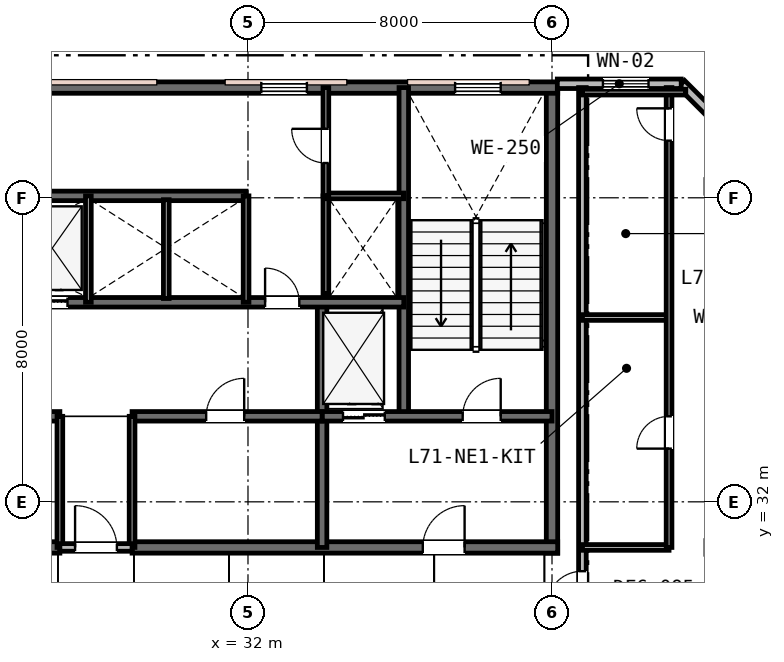
"""IFC4 building model, lengths in metres.
Left out: names, types, materials, properties, quantities, classifications, styles, units other than length and angle.
Written with IfcOpenShell. Run it as: python <this file> out.ifc"""

import sys

from ifc_helpers import new_model, si_unit, direction, frame, frame_2d, origin, place, context, subcontext, project, spatial, rectangle, extrude, element, fill, save


model = new_model("IFC4")
c1 = context("Model", 3, precision=1e-05, world=origin(), true_north=direction((0.0, 1.0)))
c2 = subcontext(c1, "Body", "Model", "MODEL_VIEW")
j1 = project(units=[si_unit("LENGTHUNIT", "METRE"), si_unit("PLANEANGLEUNIT", "RADIAN")], contexts=[c1])
p1 = place(None, origin())
s1 = spatial("IfcSite", under=j1, at=p1, CompositionType="ELEMENT")
p2 = place(p1, origin())
s2 = spatial("IfcBuilding", under=s1, at=p2, CompositionType="ELEMENT")
p3 = place(p2, frame((0.0, 0.0, 275.4)))
s3 = spatial("IfcBuildingStorey", under=s2, at=p3, CompositionType="ELEMENT", Elevation=275.4)
p4 = place(p3, frame((40.0, 30.65, 0.0), z_axis=(0.0, 0.0, 1.0), x_axis=(0.0, 1.0, 0.0)))
e1 = element("IfcWall", 1, at=p4, inside=s3, PredefinedType="SHEAR", context=c2, shape_type="SweptSolid", body=[
    extrude(rectangle(XDim=12.3, YDim=0.3, at=frame_2d((6.15, 0.0))), origin(), (0.0, 0.0, 1.0), 3.8),
])
p5 = place(p3, frame((15.85, 42.9, 0.0), z_axis=(0.0, 0.0, 1.0), x_axis=(1.0, 0.0, 0.0)))
e2 = element("IfcWall", 2, at=p5, inside=s3, PredefinedType="SHEAR", context=c2, shape_type="SweptSolid", body=[
    extrude(rectangle(XDim=24.3, YDim=0.3, at=frame_2d((12.15, 0.0))), origin(), (0.0, 0.0, 1.0), 3.8),
])
p6 = place(p5, frame((1.6, 0.0, 0.95)))
e3 = element("IfcOpeningElement", 3, at=p6, cuts=e2, PredefinedType="OPENING", context=c2, shape_type="SweptSolid", body=[
    extrude(rectangle(XDim=1.2, YDim=1.6, at=frame_2d((0.6, 0.8))), frame((0.0, 0.16, 0.0), z_axis=(0.0, -1.0, 0.0), x_axis=(1.0, 0.0, 0.0)), (0.0, 0.0, 1.0), 0.32),
])
p7 = place(p5, frame((16.5, 0.0, 0.95)))
e4 = element("IfcOpeningElement", 4, at=p7, cuts=e2, PredefinedType="OPENING", context=c2, shape_type="SweptSolid", body=[
    extrude(rectangle(XDim=1.2, YDim=1.6, at=frame_2d((0.6, 0.8))), frame((0.0, 0.16, 0.0), z_axis=(0.0, -1.0, 0.0), x_axis=(1.0, 0.0, 0.0)), (0.0, 0.0, 1.0), 0.32),
])
p8 = place(p5, frame((21.6, 0.0, 0.95)))
e5 = element("IfcOpeningElement", 5, at=p8, cuts=e2, PredefinedType="OPENING", context=c2, shape_type="SweptSolid", body=[
    extrude(rectangle(XDim=1.2, YDim=1.6, at=frame_2d((0.6, 0.8))), frame((0.0, 0.16, 0.0), z_axis=(0.0, -1.0, 0.0), x_axis=(1.0, 0.0, 0.0)), (0.0, 0.0, 1.0), 0.32),
])
p9 = place(p3, frame((15.85, 30.8, 0.0), z_axis=(0.0, 0.0, 1.0), x_axis=(1.0, 0.0, 0.0)))
e6 = element("IfcWall", 6, at=p9, inside=s3, PredefinedType="SHEAR", context=c2, shape_type="SweptSolid", body=[
    extrude(rectangle(XDim=11.2, YDim=0.3, at=frame_2d((5.6, 0.0))), origin(), (0.0, 0.0, 1.0), 3.8),
])
p10 = place(p9, frame((2.45, 0.0, 0.0)))
e7 = element("IfcOpeningElement", 7, at=p10, cuts=e6, PredefinedType="OPENING", context=c2, shape_type="SweptSolid", body=[
    extrude(rectangle(XDim=1.1, YDim=2.15, at=frame_2d((0.55, 1.075))), frame((0.0, 0.16, 0.0), z_axis=(0.0, -1.0, 0.0), x_axis=(1.0, 0.0, 0.0)), (0.0, 0.0, 1.0), 0.32),
])
p11 = place(p3, frame((28.95, 30.8, 0.0), z_axis=(0.0, 0.0, 1.0), x_axis=(1.0, 0.0, 0.0)))
e8 = element("IfcWall", 8, at=p11, inside=s3, PredefinedType="SHEAR", context=c2, shape_type="SweptSolid", body=[
    extrude(rectangle(XDim=11.2, YDim=0.3, at=frame_2d((5.6, 0.0))), origin(), (0.0, 0.0, 1.0), 3.8),
])
p12 = place(p11, frame((7.65, 0.0, 0.0)))
e9 = element("IfcOpeningElement", 9, at=p12, cuts=e8, PredefinedType="OPENING", context=c2, shape_type="SweptSolid", body=[
    extrude(rectangle(XDim=1.1, YDim=2.15, at=frame_2d((0.55, 1.075))), frame((0.0, 0.16, 0.0), z_axis=(0.0, -1.0, 0.0), x_axis=(1.0, 0.0, 0.0)), (0.0, 0.0, 1.0), 0.32),
])
p13 = place(p3, frame((36.1, 34.25, 0.0), z_axis=(0.0, 0.0, 1.0), x_axis=(0.0, 1.0, 0.0)))
e10 = element("IfcWall", 10, at=p13, inside=s3, PredefinedType="SHEAR", context=c2, shape_type="SweptSolid", body=[
    extrude(rectangle(XDim=8.65, YDim=0.25, at=frame_2d((4.325, 0.0))), origin(), (0.0, 0.0, 1.0), 3.8),
])
p14 = place(p3, frame((33.95, 30.8, 0.0), z_axis=(0.0, 0.0, 1.0), x_axis=(0.0, 1.0, 0.0)))
e11 = element("IfcWall", 11, at=p14, inside=s3, PredefinedType="SHEAR", context=c2, shape_type="SweptSolid", body=[
    extrude(rectangle(XDim=6.45, YDim=0.25, at=frame_2d((3.225, 0.0))), origin(), (0.0, 0.0, 1.0), 3.8),
])
p15 = place(p3, frame((33.95, 34.25, 0.0), z_axis=(0.0, 0.0, 1.0), x_axis=(1.0, 0.0, 0.0)))
e12 = element("IfcWall", 12, at=p15, inside=s3, PredefinedType="SHEAR", context=c2, shape_type="SweptSolid", body=[
    extrude(rectangle(XDim=6.05, YDim=0.25, at=frame_2d((3.025, 0.0))), origin(), (0.0, 0.0, 1.0), 3.8),
])
p16 = place(p15, frame((3.7, 0.0, 0.0)))
e13 = element("IfcOpeningElement", 13, at=p16, cuts=e12, PredefinedType="OPENING", context=c2, shape_type="SweptSolid", body=[
    extrude(rectangle(XDim=1.0, YDim=2.15, at=frame_2d((0.5, 1.075))), frame((0.0, 0.135, 0.0), z_axis=(0.0, -1.0, 0.0), x_axis=(1.0, 0.0, 0.0)), (0.0, 0.0, 1.0), 0.27),
])
p17 = place(p15, frame((0.55, 0.0, 0.0)))
e14 = element("IfcOpeningElement", 14, at=p17, cuts=e12, PredefinedType="OPENING", context=c2, shape_type="SweptSolid", body=[
    extrude(rectangle(XDim=1.1, YDim=2.15, at=frame_2d((0.55, 1.075))), frame((0.0, 0.135, 0.0), z_axis=(0.0, -1.0, 0.0), x_axis=(1.0, 0.0, 0.0)), (0.0, 0.0, 1.0), 0.27),
])
p18 = place(p3, frame((22.05, 34.25, 0.0), z_axis=(0.0, 0.0, 1.0), x_axis=(1.0, 0.0, 0.0)))
e15 = element("IfcWall", 15, at=p18, inside=s3, PredefinedType="SHEAR", context=c2, shape_type="SweptSolid", body=[
    extrude(rectangle(XDim=5.0, YDim=0.25, at=frame_2d((2.5, 0.0))), origin(), (0.0, 0.0, 1.0), 3.8),
])
p19 = place(p18, frame((1.95, 0.0, 0.0)))
e16 = element("IfcOpeningElement", 16, at=p19, cuts=e15, PredefinedType="OPENING", context=c2, shape_type="SweptSolid", body=[
    extrude(rectangle(XDim=1.0, YDim=2.15, at=frame_2d((0.5, 1.075))), frame((0.0, 0.135, 0.0), z_axis=(0.0, -1.0, 0.0), x_axis=(1.0, 0.0, 0.0)), (0.0, 0.0, 1.0), 0.27),
])
p20 = place(p3, frame((28.95, 34.25, 0.0), z_axis=(0.0, 0.0, 1.0), x_axis=(1.0, 0.0, 0.0)))
e17 = element("IfcWall", 17, at=p20, inside=s3, PredefinedType="SHEAR", context=c2, shape_type="SweptSolid", body=[
    extrude(rectangle(XDim=5.0, YDim=0.25, at=frame_2d((2.5, 0.0))), origin(), (0.0, 0.0, 1.0), 3.8),
])
p21 = place(p20, frame((1.95, 0.0, 0.0)))
e18 = element("IfcOpeningElement", 18, at=p21, cuts=e17, PredefinedType="OPENING", context=c2, shape_type="SweptSolid", body=[
    extrude(rectangle(XDim=1.0, YDim=2.15, at=frame_2d((0.5, 1.075))), frame((0.0, 0.135, 0.0), z_axis=(0.0, -1.0, 0.0), x_axis=(1.0, 0.0, 0.0)), (0.0, 0.0, 1.0), 0.27),
])
p22 = place(p3, frame((19.9, 37.25, 0.0), z_axis=(0.0, 0.0, 1.0), x_axis=(1.0, 0.0, 0.0)))
e19 = element("IfcWall", 19, at=p22, inside=s3, PredefinedType="SHEAR", context=c2, shape_type="SweptSolid", body=[
    extrude(rectangle(XDim=16.2, YDim=0.25, at=frame_2d((8.1, 0.0))), origin(), (0.0, 0.0, 1.0), 3.8),
])
p23 = place(p22, frame((12.55, 0.0, 0.0)))
e20 = element("IfcOpeningElement", 20, at=p23, cuts=e19, PredefinedType="OPENING", context=c2, shape_type="SweptSolid", body=[
    extrude(rectangle(XDim=0.9, YDim=2.15, at=frame_2d((0.45, 1.075))), frame((0.0, 0.135, 0.0), z_axis=(0.0, -1.0, 0.0), x_axis=(1.0, 0.0, 0.0)), (0.0, 0.0, 1.0), 0.27),
])
p24 = place(p22, frame((2.5, 0.0, 0.0)))
e21 = element("IfcOpeningElement", 21, at=p24, cuts=e19, PredefinedType="OPENING", context=c2, shape_type="SweptSolid", body=[
    extrude(rectangle(XDim=1.05, YDim=2.15, at=frame_2d((0.525, 1.075))), frame((0.0, 0.135, 0.0), z_axis=(0.0, -1.0, 0.0), x_axis=(1.0, 0.0, 0.0)), (0.0, 0.0, 1.0), 0.27),
])
p25 = place(p22, frame((4.4, 0.0, 0.0)))
e22 = element("IfcOpeningElement", 22, at=p25, cuts=e19, PredefinedType="OPENING", context=c2, shape_type="SweptSolid", body=[
    extrude(rectangle(XDim=1.05, YDim=2.15, at=frame_2d((0.525, 1.075))), frame((0.0, 0.135, 0.0), z_axis=(0.0, -1.0, 0.0), x_axis=(1.0, 0.0, 0.0)), (0.0, 0.0, 1.0), 0.27),
])
p26 = place(p22, frame((6.3, 0.0, 0.0)))
e23 = element("IfcOpeningElement", 23, at=p26, cuts=e19, PredefinedType="OPENING", context=c2, shape_type="SweptSolid", body=[
    extrude(rectangle(XDim=1.05, YDim=2.15, at=frame_2d((0.525, 1.075))), frame((0.0, 0.135, 0.0), z_axis=(0.0, -1.0, 0.0), x_axis=(1.0, 0.0, 0.0)), (0.0, 0.0, 1.0), 0.27),
])
p27 = place(p3, frame((19.9, 40.05, 0.0), z_axis=(0.0, 0.0, 1.0), x_axis=(1.0, 0.0, 0.0)))
e24 = element("IfcWall", 24, at=p27, inside=s3, PredefinedType="SHEAR", context=c2, shape_type="SweptSolid", body=[
    extrude(rectangle(XDim=12.05, YDim=0.25, at=frame_2d((6.025, 0.0))), origin(), (0.0, 0.0, 1.0), 3.8),
])
p28 = place(p3, frame((46.0, 40.4, 0.0), z_axis=(0.0, 0.0, 1.0), x_axis=(-0.707106781187, 0.707106781187, 0.0)))
e25 = element("IfcWall", 25, at=p28, inside=s3, PredefinedType="STANDARD", context=c2, shape_type="SweptSolid", body=[
    extrude(rectangle(XDim=3.677, YDim=0.25, at=frame_2d((1.839, 0.0))), origin(), (0.0, 0.0, 1.0), 3.53),
])
p29 = place(p28, frame((1.128, 0.0, 0.85)))
e26 = element("IfcOpeningElement", 26, at=p29, cuts=e25, PredefinedType="OPENING", context=c2, shape_type="SweptSolid", body=[
    extrude(rectangle(XDim=1.2, YDim=1.6, at=frame_2d((0.6, 0.8))), frame((0.0, 0.135, 0.0), z_axis=(0.0, -1.0, 0.0), x_axis=(1.0, 0.0, 0.0)), (0.0, 0.0, 1.0), 0.27),
])
p30 = place(p3, frame((43.4, 43.0, 0.0), z_axis=(0.0, 0.0, 1.0), x_axis=(-1.0, 0.0, 0.0)))
e27 = element("IfcWall", 27, at=p30, inside=s3, PredefinedType="STANDARD", context=c2, shape_type="SweptSolid", body=[
    extrude(rectangle(XDim=3.26, YDim=0.25, at=frame_2d((1.63, 0.0))), origin(), (0.0, 0.0, 1.0), 3.53),
])
p31 = place(p30, frame((0.86, 0.0, 0.85)))
e28 = element("IfcOpeningElement", 28, at=p31, cuts=e27, PredefinedType="OPENING", context=c2, shape_type="SweptSolid", body=[
    extrude(rectangle(XDim=1.2, YDim=1.6, at=frame_2d((0.6, 0.8))), frame((0.0, 0.135, 0.0), z_axis=(0.0, -1.0, 0.0), x_axis=(1.0, 0.0, 0.0)), (0.0, 0.0, 1.0), 0.27),
])
for number, where, z_axis, x_axis in (
    (29, (27.05, 30.8, 0.0), (0.0, 0.0, 1.0), (0.0, 1.0, 0.0)),
    (30, (28.95, 30.8, 0.0), (0.0, 0.0, 1.0), (0.0, 1.0, 0.0)),
):
    element("IfcWall", number, at=place(p3, frame(where, z_axis=z_axis, x_axis=x_axis)), inside=s3, PredefinedType="PLUMBINGWALL", context=c2, shape_type="SweptSolid", body=[
        extrude(rectangle(XDim=3.45, YDim=0.15, at=frame_2d((1.725, 0.0))), origin(), (0.0, 0.0, 1.0), 3.28),
    ])
p32 = place(p3, frame((27.05, 30.8, 0.0), z_axis=(0.0, 0.0, 1.0), x_axis=(1.0, 0.0, 0.0)))
e31 = element("IfcWall", 31, at=p32, inside=s3, PredefinedType="PARTITIONING", context=c2, shape_type="SweptSolid", body=[
    extrude(rectangle(XDim=1.9, YDim=0.2, at=frame_2d((0.95, 0.0))), origin(), (0.0, 0.0, 1.0), 3.28),
])
p33 = place(p32, frame((0.4, 0.0, 0.0)))
e32 = element("IfcOpeningElement", 32, at=p33, cuts=e31, PredefinedType="OPENING", context=c2, shape_type="SweptSolid", body=[
    extrude(rectangle(XDim=1.1, YDim=2.15, at=frame_2d((0.55, 1.075))), frame((0.0, 0.11, 0.0), z_axis=(0.0, -1.0, 0.0), x_axis=(1.0, 0.0, 0.0)), (0.0, 0.0, 1.0), 0.22),
])
for number, where, z_axis, x_axis in (
    (33, (27.8, 37.25, 0.0), (0.0, 0.0, 1.0), (0.0, 1.0, 0.0)),
    (34, (31.95, 37.25, 0.0), (0.0, 0.0, 1.0), (0.0, 1.0, 0.0)),
):
    element("IfcWall", number, at=place(p3, frame(where, z_axis=z_axis, x_axis=x_axis)), inside=s3, PredefinedType="PLUMBINGWALL", context=c2, shape_type="SweptSolid", body=[
        extrude(rectangle(XDim=2.8, YDim=0.15, at=frame_2d((1.4, 0.0))), origin(), (0.0, 0.0, 1.0), 3.53),
    ])
p34 = place(p3, frame((29.85, 37.35, 0.0), z_axis=(0.0, 0.0, 1.0), x_axis=(0.0, 1.0, 0.0)))
e35 = element("IfcWall", 35, at=p34, inside=s3, PredefinedType="PLUMBINGWALL", context=c2, shape_type="SweptSolid", body=[
    extrude(rectangle(XDim=2.6, YDim=0.15, at=frame_2d((1.3, 0.0))), origin(), (0.0, 0.0, 1.0), 3.53),
])
p35 = place(p3, frame((34.05, 37.473, 0.0), z_axis=(0.0, 0.0, 1.0), x_axis=(0.0, 1.0, 0.0)))
e36 = element("IfcWall", 36, at=p35, inside=s3, PredefinedType="PLUMBINGWALL", context=c2, shape_type="SweptSolid", body=[
    extrude(rectangle(XDim=2.577, YDim=0.15, at=frame_2d((1.288, 0.0))), origin(), (0.0, 0.0, 1.0), 3.53),
])
p36 = place(p3, frame((34.05, 40.05, 0.0), z_axis=(0.0, 0.0, 1.0), x_axis=(1.0, 0.0, 0.0)))
e37 = element("IfcWall", 37, at=p36, inside=s3, PredefinedType="PARTITIONING", context=c2, shape_type="SweptSolid", body=[
    extrude(rectangle(XDim=2.05, YDim=0.15, at=frame_2d((1.025, 0.0))), origin(), (0.0, 0.0, 1.0), 3.53),
])
p37 = place(p3, frame((34.05, 40.05, 0.0), z_axis=(0.0, 0.0, 1.0), x_axis=(0.0, 1.0, 0.0)))
e38 = element("IfcWall", 38, at=p37, inside=s3, PredefinedType="PARTITIONING", context=c2, shape_type="SweptSolid", body=[
    extrude(rectangle(XDim=2.85, YDim=0.15, at=frame_2d((1.425, 0.0))), origin(), (0.0, 0.0, 1.0), 3.53),
])
p38 = place(p37, frame((0.865, 0.0, 0.0)))
e39 = element("IfcOpeningElement", 39, at=p38, cuts=e38, PredefinedType="OPENING", context=c2, shape_type="SweptSolid", body=[
    extrude(rectangle(XDim=0.9, YDim=2.15, at=frame_2d((0.45, 1.075))), frame((0.0, 0.085, 0.0), z_axis=(0.0, -1.0, 0.0), x_axis=(1.0, 0.0, 0.0)), (0.0, 0.0, 1.0), 0.17),
])
p39 = place(p3, frame((40.8, 28.6, 0.0), z_axis=(0.0, 0.0, 1.0), x_axis=(0.0, 1.0, 0.0)))
e40 = element("IfcWall", 40, at=p39, inside=s3, PredefinedType="PARTITIONING", context=c2, shape_type="SweptSolid", body=[
    extrude(rectangle(XDim=14.3, YDim=0.2, at=frame_2d((7.15, 0.0))), origin(), (0.0, 0.0, 1.0), 3.16),
])
p40 = place(p39, frame((0.625, 0.0, 0.0)))
e41 = element("IfcOpeningElement", 41, at=p40, cuts=e40, PredefinedType="OPENING", context=c2, shape_type="SweptSolid", body=[
    extrude(rectangle(XDim=0.95, YDim=2.15, at=frame_2d((0.475, 1.075))), frame((0.0, 0.11, 0.0), z_axis=(0.0, -1.0, 0.0), x_axis=(1.0, 0.0, 0.0)), (0.0, 0.0, 1.0), 0.22),
])
p41 = place(p3, frame((40.8, 30.8, 0.0), z_axis=(0.0, 0.0, 1.0), x_axis=(1.0, 0.0, 0.0)))
e42 = element("IfcWall", 42, at=p41, inside=s3, PredefinedType="PARTITIONING", context=c2, shape_type="SweptSolid", body=[
    extrude(rectangle(XDim=2.28, YDim=0.15, at=frame_2d((1.14, 0.0))), origin(), (0.0, 0.0, 1.0), 3.16),
])
p42 = place(p3, frame((40.8, 36.85, 0.0), z_axis=(0.0, 0.0, 1.0), x_axis=(1.0, 0.0, 0.0)))
e43 = element("IfcWall", 43, at=p42, inside=s3, PredefinedType="PARTITIONING", context=c2, shape_type="SweptSolid", body=[
    extrude(rectangle(XDim=2.28, YDim=0.15, at=frame_2d((1.14, 0.0))), origin(), (0.0, 0.0, 1.0), 3.53),
])
p43 = place(p3, frame((43.08, 30.8, 0.0), z_axis=(0.0, 0.0, 1.0), x_axis=(0.0, 1.0, 0.0)))
e44 = element("IfcWall", 44, at=p43, inside=s3, PredefinedType="PARTITIONING", context=c2, shape_type="SweptSolid", body=[
    extrude(rectangle(XDim=12.1, YDim=0.15, at=frame_2d((6.05, 0.0))), origin(), (0.0, 0.0, 1.0), 3.16),
])
p44 = place(p43, frame((2.6, 0.0, 0.0)))
e45 = element("IfcOpeningElement", 45, at=p44, cuts=e44, PredefinedType="OPENING", context=c2, shape_type="SweptSolid", body=[
    extrude(rectangle(XDim=0.85, YDim=2.15, at=frame_2d((0.425, 1.075))), frame((0.0, 0.085, 0.0), z_axis=(0.0, -1.0, 0.0), x_axis=(1.0, 0.0, 0.0)), (0.0, 0.0, 1.0), 0.17),
])
p45 = place(p43, frame((10.704, 0.0, 0.0)))
e46 = element("IfcOpeningElement", 46, at=p45, cuts=e44, PredefinedType="OPENING", context=c2, shape_type="SweptSolid", body=[
    extrude(rectangle(XDim=0.85, YDim=2.15, at=frame_2d((0.425, 1.075))), frame((0.0, 0.085, 0.0), z_axis=(0.0, -1.0, 0.0), x_axis=(1.0, 0.0, 0.0)), (0.0, 0.0, 1.0), 0.17),
])
p46 = place(p3, frame((40.8, 42.78, 0.0), z_axis=(0.0, 0.0, 1.0), x_axis=(1.0, 0.0, 0.0)))
e47 = element("IfcWall", 47, at=p46, inside=s3, PredefinedType="PARTITIONING", context=c2, shape_type="SweptSolid", body=[
    extrude(rectangle(XDim=2.72, YDim=0.15, at=frame_2d((1.36, 0.0))), origin(), (0.0, 0.0, 1.0), 3.53),
])
p47 = place(p7, origin())
e48 = element("IfcWindow", 48, at=p47, inside=s3, PartitioningType="SINGLE_PANEL", PredefinedType="WINDOW", context=c2, shape_type="SweptSolid", body=[
    extrude(rectangle(XDim=1.2, YDim=1.6, at=frame_2d((0.6, 0.8))), frame((0.0, 0.03, 0.0), z_axis=(0.0, -1.0, 0.0), x_axis=(1.0, 0.0, 0.0)), (0.0, 0.0, 1.0), 0.06),
])
fill(e4, e48)
p48 = place(p8, origin())
e49 = element("IfcWindow", 49, at=p48, inside=s3, PartitioningType="SINGLE_PANEL", PredefinedType="WINDOW", context=c2, shape_type="SweptSolid", body=[
    extrude(rectangle(XDim=1.2, YDim=1.6, at=frame_2d((0.6, 0.8))), frame((0.0, 0.03, 0.0), z_axis=(0.0, -1.0, 0.0), x_axis=(1.0, 0.0, 0.0)), (0.0, 0.0, 1.0), 0.06),
])
fill(e5, e49)
p49 = place(p31, origin())
e50 = element("IfcWindow", 50, at=p49, inside=s3, PartitioningType="SINGLE_PANEL", PredefinedType="WINDOW", context=c2, shape_type="SweptSolid", body=[
    extrude(rectangle(XDim=1.2, YDim=1.6, at=frame_2d((0.6, 0.8))), frame((0.0, 0.03, 0.0), z_axis=(0.0, -1.0, 0.0), x_axis=(1.0, 0.0, 0.0)), (0.0, 0.0, 1.0), 0.06),
])
fill(e28, e50)
p50 = place(p33, origin())
e51 = element("IfcDoor", 51, at=p50, inside=s3, OperationType="SINGLE_SWING_LEFT", PredefinedType="DOOR", context=c2, shape_type="SweptSolid", body=[
    extrude(rectangle(XDim=1.1, YDim=2.15, at=frame_2d((0.55, 1.075))), frame((0.0, 0.025, 0.0), z_axis=(0.0, -1.0, 0.0), x_axis=(1.0, 0.0, 0.0)), (0.0, 0.0, 1.0), 0.05),
])
fill(e32, e51)
p51 = place(p16, origin())
e52 = element("IfcDoor", 52, at=p51, inside=s3, OperationType="SINGLE_SWING_RIGHT", PredefinedType="DOOR", context=c2, shape_type="SweptSolid", body=[
    extrude(rectangle(XDim=1.0, YDim=2.15, at=frame_2d((0.5, 1.075))), frame((0.0, 0.025, 0.0), z_axis=(0.0, -1.0, 0.0), x_axis=(1.0, 0.0, 0.0)), (0.0, 0.0, 1.0), 0.05),
])
fill(e13, e52)
p52 = place(p12, origin())
e53 = element("IfcDoor", 53, at=p52, inside=s3, OperationType="SINGLE_SWING_RIGHT", PredefinedType="DOOR", context=c2, shape_type="SweptSolid", body=[
    extrude(rectangle(XDim=1.1, YDim=2.15, at=frame_2d((0.55, 1.075))), frame((0.0, 0.025, 0.0), z_axis=(0.0, -1.0, 0.0), x_axis=(1.0, 0.0, 0.0)), (0.0, 0.0, 1.0), 0.05),
])
fill(e9, e53)
p53 = place(p21, origin())
e54 = element("IfcDoor", 54, at=p53, inside=s3, OperationType="SINGLE_SWING_RIGHT", PredefinedType="DOOR", context=c2, shape_type="SweptSolid", body=[
    extrude(rectangle(XDim=1.0, YDim=2.15, at=frame_2d((0.5, 1.075))), frame((0.0, 0.025, 0.0), z_axis=(0.0, -1.0, 0.0), x_axis=(1.0, 0.0, 0.0)), (0.0, 0.0, 1.0), 0.05),
])
fill(e18, e54)
p54 = place(p23, origin())
e55 = element("IfcDoor", 55, at=p54, inside=s3, OperationType="SINGLE_SWING_LEFT", PredefinedType="DOOR", context=c2, shape_type="SweptSolid", body=[
    extrude(rectangle(XDim=0.9, YDim=2.15, at=frame_2d((0.45, 1.075))), frame((0.0, 0.025, 0.0), z_axis=(0.0, -1.0, 0.0), x_axis=(1.0, 0.0, 0.0)), (0.0, 0.0, 1.0), 0.05),
])
fill(e20, e55)
p55 = place(p38, origin())
e56 = element("IfcDoor", 56, at=p55, inside=s3, OperationType="SINGLE_SWING_RIGHT", PredefinedType="DOOR", context=c2, shape_type="SweptSolid", body=[
    extrude(rectangle(XDim=0.9, YDim=2.15, at=frame_2d((0.45, 1.075))), frame((0.0, 0.025, 0.0), z_axis=(0.0, -1.0, 0.0), x_axis=(1.0, 0.0, 0.0)), (0.0, 0.0, 1.0), 0.05),
])
fill(e39, e56)
p56 = place(p40, origin())
e57 = element("IfcDoor", 57, at=p56, inside=s3, OperationType="SINGLE_SWING_LEFT", PredefinedType="DOOR", context=c2, shape_type="SweptSolid", body=[
    extrude(rectangle(XDim=0.95, YDim=2.15, at=frame_2d((0.475, 1.075))), frame((0.0, 0.025, 0.0), z_axis=(0.0, -1.0, 0.0), x_axis=(1.0, 0.0, 0.0)), (0.0, 0.0, 1.0), 0.05),
])
fill(e41, e57)
p57 = place(p44, origin())
e58 = element("IfcDoor", 58, at=p57, inside=s3, OperationType="SINGLE_SWING_LEFT", PredefinedType="DOOR", context=c2, shape_type="SweptSolid", body=[
    extrude(rectangle(XDim=0.85, YDim=2.15, at=frame_2d((0.425, 1.075))), frame((0.0, 0.025, 0.0), z_axis=(0.0, -1.0, 0.0), x_axis=(1.0, 0.0, 0.0)), (0.0, 0.0, 1.0), 0.05),
])
fill(e45, e58)
p58 = place(p45, origin())
e59 = element("IfcDoor", 59, at=p58, inside=s3, OperationType="SINGLE_SWING_RIGHT", PredefinedType="DOOR", context=c2, shape_type="SweptSolid", body=[
    extrude(rectangle(XDim=0.85, YDim=2.15, at=frame_2d((0.425, 1.075))), frame((0.0, 0.025, 0.0), z_axis=(0.0, -1.0, 0.0), x_axis=(1.0, 0.0, 0.0)), (0.0, 0.0, 1.0), 0.05),
])
fill(e46, e59)
p59 = place(p17, origin())
e60 = element("IfcDoor", 60, at=p59, inside=s3, OperationType="DOUBLE_DOOR_SLIDING", PredefinedType="DOOR", context=c2, shape_type="SweptSolid", body=[
    extrude(rectangle(XDim=1.1, YDim=2.15, at=frame_2d((0.55, 1.075))), frame((0.0, 0.025, 0.0), z_axis=(0.0, -1.0, 0.0), x_axis=(1.0, 0.0, 0.0)), (0.0, 0.0, 1.0), 0.05),
])
fill(e14, e60)
p60 = place(p26, origin())
e61 = element("IfcDoor", 61, at=p60, inside=s3, OperationType="DOUBLE_DOOR_SLIDING", PredefinedType="DOOR", context=c2, shape_type="SweptSolid", body=[
    extrude(rectangle(XDim=1.05, YDim=2.15, at=frame_2d((0.525, 1.075))), frame((0.0, 0.025, 0.0), z_axis=(0.0, -1.0, 0.0), x_axis=(1.0, 0.0, 0.0)), (0.0, 0.0, 1.0), 0.05),
])
fill(e23, e61)
save(model, sys.argv[1])
